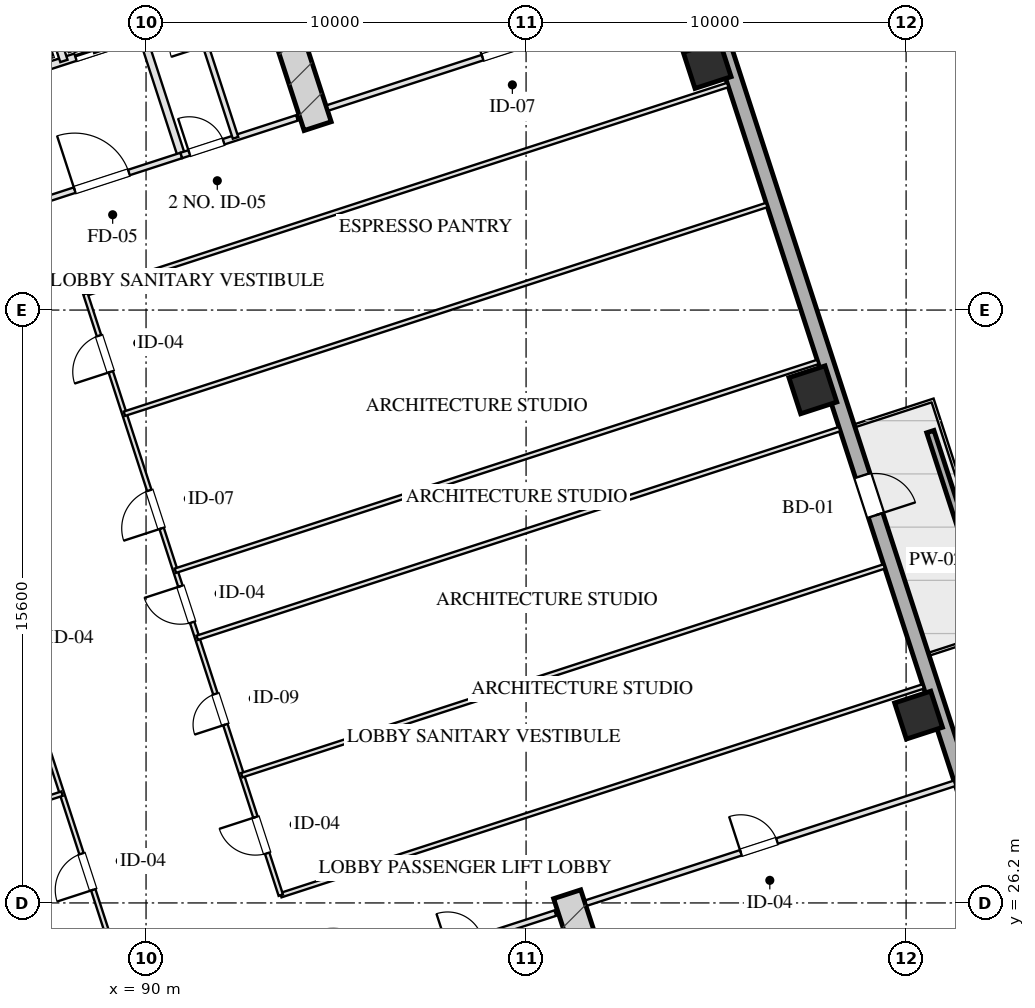
"""IFC4 building model, lengths in metres.
Left out: names, types, materials, properties, quantities, classifications, styles, units other than length and angle.
Written with IfcOpenShell. Run it as: python <this file> out.ifc"""

import sys

from ifc_helpers import new_model, si_unit, direction, frame, frame_2d, origin, origin_2d, place, context, subcontext, project, spatial, rectangle, hollow_rectangle, extrude, element, fill, save


model = new_model("IFC4")
c1 = context("Model", 3, precision=1e-05, world=origin(), true_north=direction((0.0, 1.0)))
c2 = subcontext(c1, "Body", "Model", "MODEL_VIEW")
j1 = project(units=[si_unit("LENGTHUNIT", "METRE"), si_unit("PLANEANGLEUNIT", "RADIAN")], contexts=[c1])
p1 = place(None, origin())
s1 = spatial("IfcSite", under=j1, at=p1, CompositionType="ELEMENT")
p2 = place(p1, origin())
s2 = spatial("IfcBuilding", under=s1, at=p2, CompositionType="ELEMENT")
p3 = place(p2, frame((0.0, 0.0, 60.95)))
s3 = spatial("IfcBuildingStorey", under=s2, at=p3, CompositionType="ELEMENT", Elevation=60.95)
for number, where, z_axis, x_axis in (
    (1, (101.082, 26.429, 0.0), (0.0, 0.0, 1.0), (0.309, -0.951, 0.0)),
    (2, (94.515, 46.639, 0.0), (0.0, 0.0, 1.0), (-0.309, 0.951, 0.0)),
):
    element("IfcWall", number, at=place(p3, frame(where, z_axis=z_axis, x_axis=x_axis)), inside=s3, PredefinedType="SHEAR", context=c2, shape_type="SweptSolid", body=[
        extrude(rectangle(XDim=9.63, YDim=0.75, at=frame_2d((4.815, 0.0))), origin(), (0.0, 0.0, 1.0), 3.45),
    ])
for number, where, z_axis, x_axis in (
    (3, (110.328, 31.142, 0.0), (0.0, 0.0, 1.0), (0.951, 0.309, 0.0)),
    (4, (107.547, 39.701, 0.0), (0.0, 0.0, 1.0), (0.951, 0.309, 0.0)),
    (5, (104.766, 48.261, 0.0), (0.0, 0.0, 1.0), (0.951, 0.309, 0.0)),
):
    element("IfcColumn", number, at=place(p3, frame(where, z_axis=z_axis, x_axis=x_axis)), inside=s3, PredefinedType="COLUMN", context=c2, shape_type="SweptSolid", body=[
        extrude(hollow_rectangle(XDim=1.0, YDim=1.0, WallThickness=0.036, at=origin_2d()), origin(), (0.0, 0.0, 1.0), 3.451),
    ])
p4 = place(p3, frame((100.345, 63.648, 0.0), z_axis=(0.0, 0.0, 1.0), x_axis=(0.309014526607, -0.951057318118, 0.0)))
e6 = element("IfcWall", 6, at=p4, inside=s3, PredefinedType="SOLIDWALL", context=c2, shape_type="SweptSolid", body=[
    extrude(rectangle(XDim=50.0, YDim=0.4, at=frame_2d((25.0, 0.0))), origin(), (0.0, 0.0, 1.0), 2.61),
])
p5 = place(p4, frame((27.55, 0.0, 0.0)))
e7 = element("IfcOpeningElement", 7, at=p5, cuts=e6, PredefinedType="OPENING", context=c2, shape_type="SweptSolid", body=[
    extrude(rectangle(XDim=1.1, YDim=2.15, at=frame_2d((0.55, 1.075))), frame((0.0, 0.21, 0.0), z_axis=(0.0, -1.0, 0.0), x_axis=(1.0, 0.0, 0.0)), (0.0, 0.0, 1.0), 0.42),
])
p6 = place(p3, frame((112.121, 34.038, 0.0), z_axis=(0.0, 0.0, 1.0), x_axis=(-0.309032019345, 0.951051634255, 0.0)))
e8 = element("IfcWall", 8, at=p6, inside=s3, PredefinedType="PARAPET", context=c2, shape_type="SweptSolid", body=[
    extrude(rectangle(XDim=4.8, YDim=0.2, at=frame_2d((2.4, 0.0))), origin(), (0.0, 0.0, 1.0), 0.75),
])
p7 = place(p3, frame((97.727, 24.944, 0.0), z_axis=(0.0, 0.0, 1.0), x_axis=(0.951036872128, 0.309077446369, 0.0)))
e9 = element("IfcWall", 9, at=p7, inside=s3, PredefinedType="PARTITIONING", context=c2, shape_type="SweptSolid", body=[
    extrude(rectangle(XDim=3.2, YDim=0.15, at=frame_2d((1.6, 0.0))), origin(), (0.0, 0.0, 1.0), 3.175),
])
p8 = place(p7, frame((0.22, 0.0, 0.0)))
e10 = element("IfcOpeningElement", 10, at=p8, cuts=e9, PredefinedType="OPENING", context=c2, shape_type="SweptSolid", body=[
    extrude(rectangle(XDim=0.95, YDim=2.05, at=frame_2d((0.475, 1.025))), frame((0.0, 0.085, 0.0), z_axis=(0.0, -1.0, 0.0), x_axis=(1.0, 0.0, 0.0)), (0.0, 0.0, 1.0), 0.17),
])
p9 = place(p3, frame((90.928, 45.868, 0.0), z_axis=(0.0, 0.0, 1.0), x_axis=(-0.309042196757, 0.951048327176, 0.0)))
e11 = element("IfcWall", 11, at=p9, inside=s3, PredefinedType="PARTITIONING", context=c2, shape_type="SweptSolid", body=[
    extrude(rectangle(XDim=8.43, YDim=0.2, at=frame_2d((4.215, 0.0))), origin(), (0.0, 0.0, 1.0), 3.175),
])
p10 = place(p3, frame((86.743, 44.508, 0.0), z_axis=(0.0, 0.0, 1.0), x_axis=(0.951063829732, 0.308994485023, 0.0)))
e12 = element("IfcWall", 12, at=p10, inside=s3, PredefinedType="PARTITIONING", context=c2, shape_type="SweptSolid", body=[
    extrude(rectangle(XDim=4.4, YDim=0.15, at=frame_2d((2.2, 0.0))), origin(), (0.0, 0.0, 1.0), 3.175),
])
p11 = place(p10, frame((1.45, 0.0, 0.0)))
e13 = element("IfcOpeningElement", 13, at=p11, cuts=e12, PredefinedType="OPENING", context=c2, shape_type="SweptSolid", body=[
    extrude(rectangle(XDim=1.5, YDim=2.05, at=frame_2d((0.75, 1.025))), frame((0.0, 0.085, 0.0), z_axis=(0.0, -1.0, 0.0), x_axis=(1.0, 0.0, 0.0)), (0.0, 0.0, 1.0), 0.17),
])
p12 = place(p3, frame((85.718, 47.666, 0.0), z_axis=(0.0, 0.0, 1.0), x_axis=(0.951058531764, 0.30901079133, 0.0)))
e14 = element("IfcWall", 14, at=p12, inside=s3, PredefinedType="PARTITIONING", context=c2, shape_type="SweptSolid", body=[
    extrude(rectangle(XDim=4.4, YDim=0.2, at=frame_2d((2.2, 0.0))), origin(), (0.0, 0.0, 1.0), 3.175),
])
p13 = place(p12, frame((0.45, 0.0, 0.0)))
e15 = element("IfcOpeningElement", 15, at=p13, cuts=e14, PredefinedType="OPENING", context=c2, shape_type="SweptSolid", body=[
    extrude(rectangle(XDim=1.1, YDim=2.05, at=frame_2d((0.55, 1.025))), frame((0.0, 0.11, 0.0), z_axis=(0.0, -1.0, 0.0), x_axis=(1.0, 0.0, 0.0)), (0.0, 0.0, 1.0), 0.22),
])
p14 = place(p12, frame((2.55, 0.0, 0.0)))
e16 = element("IfcOpeningElement", 16, at=p14, cuts=e14, PredefinedType="OPENING", context=c2, shape_type="SweptSolid", body=[
    extrude(rectangle(XDim=1.1, YDim=2.05, at=frame_2d((0.55, 1.025))), frame((0.0, 0.11, 0.0), z_axis=(0.0, -1.0, 0.0), x_axis=(1.0, 0.0, 0.0)), (0.0, 0.0, 1.0), 0.22),
])
p15 = place(p3, frame((87.838, 48.354, 0.0), z_axis=(0.0, 0.0, 1.0), x_axis=(-0.3090093719, 0.951058992953, 0.0)))
e17 = element("IfcWall", 17, at=p15, inside=s3, PredefinedType="PARTITIONING", context=c2, shape_type="SweptSolid", body=[
    extrude(rectangle(XDim=5.11, YDim=0.2, at=frame_2d((2.555, 0.0))), origin(), (0.0, 0.0, 1.0), 3.175),
])
p16 = place(p3, frame((90.928, 45.868, 0.0), z_axis=(0.0, 0.0, 1.0), x_axis=(0.951059297078, 0.309008435874, 0.0)))
e18 = element("IfcWall", 18, at=p16, inside=s3, PredefinedType="PARTITIONING", context=c2, shape_type="SweptSolid", body=[
    extrude(rectangle(XDim=3.2, YDim=0.15, at=frame_2d((1.6, 0.0))), origin(), (0.0, 0.0, 1.0), 3.175),
])
p17 = place(p16, frame((0.22, 0.0, 0.0)))
e19 = element("IfcOpeningElement", 19, at=p17, cuts=e18, PredefinedType="OPENING", context=c2, shape_type="SweptSolid", body=[
    extrude(rectangle(XDim=0.95, YDim=2.05, at=frame_2d((0.475, 1.025))), frame((0.0, 0.085, 0.0), z_axis=(0.0, -1.0, 0.0), x_axis=(1.0, 0.0, 0.0)), (0.0, 0.0, 1.0), 0.17),
])
p18 = place(p3, frame((92.355, 46.331, 0.0), z_axis=(0.0, 0.0, 1.0), x_axis=(-0.309007490203, 0.951059604335, 0.0)))
e20 = element("IfcWall", 20, at=p18, inside=s3, PredefinedType="PARTITIONING", context=c2, shape_type="SweptSolid", body=[
    extrude(rectangle(XDim=8.43, YDim=0.15, at=frame_2d((4.215, 0.0))), origin(), (0.0, 0.0, 1.0), 3.175),
])
p19 = place(p18, frame((2.55, 0.0, 0.0)))
e21 = element("IfcOpeningElement", 21, at=p19, cuts=e20, PredefinedType="OPENING", context=c2, shape_type="SweptSolid", body=[
    extrude(rectangle(XDim=0.95, YDim=2.05, at=frame_2d((0.475, 1.025))), frame((0.0, 0.085, 0.0), z_axis=(0.0, -1.0, 0.0), x_axis=(1.0, 0.0, 0.0)), (0.0, 0.0, 1.0), 0.17),
])
p20 = place(p18, frame((4.7, 0.0, 0.0)))
e22 = element("IfcOpeningElement", 22, at=p20, cuts=e20, PredefinedType="OPENING", context=c2, shape_type="SweptSolid", body=[
    extrude(rectangle(XDim=0.9, YDim=2.05, at=frame_2d((0.45, 1.025))), frame((0.0, 0.085, 0.0), z_axis=(0.0, -1.0, 0.0), x_axis=(1.0, 0.0, 0.0)), (0.0, 0.0, 1.0), 0.17),
])
p21 = place(p18, frame((6.8, 0.0, 0.0)))
e23 = element("IfcOpeningElement", 23, at=p21, cuts=e20, PredefinedType="OPENING", context=c2, shape_type="SweptSolid", body=[
    extrude(rectangle(XDim=0.9, YDim=2.05, at=frame_2d((0.45, 1.025))), frame((0.0, 0.085, 0.0), z_axis=(0.0, -1.0, 0.0), x_axis=(1.0, 0.0, 0.0)), (0.0, 0.0, 1.0), 0.17),
])
p22 = place(p3, frame((101.578, 26.196, 0.0), z_axis=(0.0, 0.0, 1.0), x_axis=(0.951059043131, 0.309009217467, 0.0)))
e24 = element("IfcWall", 24, at=p22, inside=s3, PredefinedType="PARTITIONING", context=c2, shape_type="SweptSolid", body=[
    extrude(rectangle(XDim=10.2, YDim=0.15, at=frame_2d((5.1, 0.0))), origin(), (0.0, 0.0, 1.0), 3.175),
])
p23 = place(p22, frame((4.284, 0.0, 0.0)))
e25 = element("IfcOpeningElement", 25, at=p23, cuts=e24, PredefinedType="OPENING", context=c2, shape_type="SweptSolid", body=[
    extrude(rectangle(XDim=1.0, YDim=2.05, at=frame_2d((0.5, 1.025))), frame((0.0, 0.085, 0.0), z_axis=(0.0, -1.0, 0.0), x_axis=(1.0, 0.0, 0.0)), (0.0, 0.0, 1.0), 0.17),
])
p24 = place(p3, frame((94.78, 47.119, 0.0), z_axis=(0.0, 0.0, 1.0), x_axis=(0.951054294345, 0.309023832749, 0.0)))
e26 = element("IfcWall", 26, at=p24, inside=s3, PredefinedType="PARTITIONING", context=c2, shape_type="SweptSolid", body=[
    extrude(rectangle(XDim=10.2, YDim=0.15, at=frame_2d((5.1, 0.0))), origin(), (0.0, 0.0, 1.0), 3.175),
])
p25 = place(p24, frame((4.284, 0.0, 0.0)))
e27 = element("IfcOpeningElement", 27, at=p25, cuts=e26, PredefinedType="OPENING", context=c2, shape_type="SweptSolid", body=[
    extrude(rectangle(XDim=1.05, YDim=2.05, at=frame_2d((0.525, 1.025))), frame((0.0, 0.085, 0.0), z_axis=(0.0, -1.0, 0.0), x_axis=(1.0, 0.0, 0.0)), (0.0, 0.0, 1.0), 0.17),
])
p26 = place(p3, frame((93.546, 26.404, 0.0), z_axis=(0.0, 0.0, 1.0), x_axis=(0.951058189574, 0.309011844505, 0.0)))
e28 = element("IfcWall", 28, at=p26, inside=s3, PredefinedType="PARTITIONING", context=c2, shape_type="SweptSolid", body=[
    extrude(rectangle(XDim=17.775, YDim=0.12, at=frame_2d((8.887, 0.0))), origin(), (0.0, 0.0, 1.0), 3.175),
])
p27 = place(p3, frame((88.404, 42.229, 0.0), z_axis=(0.0, 0.0, 1.0), x_axis=(0.951054152931, 0.309024267966, 0.0)))
e29 = element("IfcWall", 29, at=p27, inside=s3, PredefinedType="PARTITIONING", context=c2, shape_type="SweptSolid", body=[
    extrude(rectangle(XDim=17.775, YDim=0.12, at=frame_2d((8.888, 0.0))), origin(), (0.0, 0.0, 1.0), 3.175),
])
p28 = place(p3, frame((89.124, 24.967, 0.0), z_axis=(0.0, 0.0, 1.0), x_axis=(-0.30901773025, 0.951056277195, 0.0)))
e30 = element("IfcWall", 30, at=p28, inside=s3, PredefinedType="PARTITIONING", context=c2, shape_type="SweptSolid", body=[
    extrude(rectangle(XDim=16.64, YDim=0.12, at=frame_2d((8.32, 0.0))), origin(), (0.0, 0.0, 1.0), 3.175),
])
p29 = place(p28, frame((1.66, 0.0, 0.0)))
e31 = element("IfcOpeningElement", 31, at=p29, cuts=e30, PredefinedType="OPENING", context=c2, shape_type="SweptSolid", body=[
    extrude(rectangle(XDim=1.0, YDim=2.05, at=frame_2d((0.5, 1.025))), frame((0.0, 0.07, 0.0), z_axis=(0.0, -1.0, 0.0), x_axis=(1.0, 0.0, 0.0)), (0.0, 0.0, 1.0), 0.14),
])
p30 = place(p28, frame((7.82, 0.0, 0.0)))
e32 = element("IfcOpeningElement", 32, at=p30, cuts=e30, PredefinedType="OPENING", context=c2, shape_type="SweptSolid", body=[
    extrude(rectangle(XDim=1.0, YDim=2.05, at=frame_2d((0.5, 1.025))), frame((0.0, 0.07, 0.0), z_axis=(0.0, -1.0, 0.0), x_axis=(1.0, 0.0, 0.0)), (0.0, 0.0, 1.0), 0.14),
])
p31 = place(p28, frame((13.98, 0.0, 0.0)))
e33 = element("IfcOpeningElement", 33, at=p31, cuts=e30, PredefinedType="OPENING", context=c2, shape_type="SweptSolid", body=[
    extrude(rectangle(XDim=1.0, YDim=2.05, at=frame_2d((0.5, 1.025))), frame((0.0, 0.07, 0.0), z_axis=(0.0, -1.0, 0.0), x_axis=(1.0, 0.0, 0.0)), (0.0, 0.0, 1.0), 0.14),
])
p32 = place(p3, frame((93.546, 26.404, 0.0), z_axis=(0.0, 0.0, 1.0), x_axis=(-0.309022042254, 0.951054876125, 0.0)))
e34 = element("IfcWall", 34, at=p32, inside=s3, PredefinedType="PARTITIONING", context=c2, shape_type="SweptSolid", body=[
    extrude(rectangle(XDim=16.64, YDim=0.12, at=frame_2d((8.32, 0.0))), origin(), (0.0, 0.0, 1.0), 3.175),
])
p33 = place(p32, frame((1.16, 0.0, 0.0)))
e35 = element("IfcOpeningElement", 35, at=p33, cuts=e34, PredefinedType="OPENING", context=c2, shape_type="SweptSolid", body=[
    extrude(rectangle(XDim=1.0, YDim=2.05, at=frame_2d((0.5, 1.025))), frame((0.0, 0.07, 0.0), z_axis=(0.0, -1.0, 0.0), x_axis=(1.0, 0.0, 0.0)), (0.0, 0.0, 1.0), 0.14),
])
p34 = place(p32, frame((4.72, 0.0, 0.0)))
e36 = element("IfcOpeningElement", 36, at=p34, cuts=e34, PredefinedType="OPENING", context=c2, shape_type="SweptSolid", body=[
    extrude(rectangle(XDim=0.85, YDim=2.05, at=frame_2d((0.425, 1.025))), frame((0.0, 0.07, 0.0), z_axis=(0.0, -1.0, 0.0), x_axis=(1.0, 0.0, 0.0)), (0.0, 0.0, 1.0), 0.14),
])
p35 = place(p32, frame((7.549, 0.0, 0.0)))
e37 = element("IfcOpeningElement", 37, at=p35, cuts=e34, PredefinedType="OPENING", context=c2, shape_type="SweptSolid", body=[
    extrude(rectangle(XDim=1.0, YDim=2.05, at=frame_2d((0.5, 1.025))), frame((0.0, 0.07, 0.0), z_axis=(0.0, -1.0, 0.0), x_axis=(1.0, 0.0, 0.0)), (0.0, 0.0, 1.0), 0.14),
])
p36 = place(p32, frame((10.148, 0.0, 0.0)))
e38 = element("IfcOpeningElement", 38, at=p36, cuts=e34, PredefinedType="OPENING", context=c2, shape_type="SweptSolid", body=[
    extrude(rectangle(XDim=1.05, YDim=2.05, at=frame_2d((0.525, 1.025))), frame((0.0, 0.07, 0.0), z_axis=(0.0, -1.0, 0.0), x_axis=(1.0, 0.0, 0.0)), (0.0, 0.0, 1.0), 0.14),
])
p37 = place(p32, frame((14.48, 0.0, 0.0)))
e39 = element("IfcOpeningElement", 39, at=p37, cuts=e34, PredefinedType="OPENING", context=c2, shape_type="SweptSolid", body=[
    extrude(rectangle(XDim=1.0, YDim=2.05, at=frame_2d((0.5, 1.025))), frame((0.0, 0.07, 0.0), z_axis=(0.0, -1.0, 0.0), x_axis=(1.0, 0.0, 0.0)), (0.0, 0.0, 1.0), 0.14),
])
p38 = place(p3, frame((73.356, 24.386, 0.0), z_axis=(0.0, 0.0, 1.0), x_axis=(0.951054756643, 0.309022409974, 0.0)))
e40 = element("IfcWall", 40, at=p38, inside=s3, PredefinedType="PARTITIONING", context=c2, shape_type="SweptSolid", body=[
    extrude(rectangle(XDim=15.175, YDim=0.12, at=frame_2d((7.587, 0.0))), origin(), (0.0, 0.0, 1.0), 3.175),
])
for number, where, z_axis, x_axis in (
    (41, (92.52, 29.562, 0.0), (0.0, 0.0, 1.0), (0.951, 0.309, 0.0)),
    (42, (91.346, 33.176, 0.0), (0.0, 0.0, 1.0), (0.951, 0.309, 0.0)),
    (43, (90.772, 34.942, 0.0), (0.0, 0.0, 1.0), (0.951, 0.309, 0.0)),
    (44, (89.43, 39.072, 0.0), (0.0, 0.0, 1.0), (0.951, 0.309, 0.0)),
):
    element("IfcWall", number, at=place(p3, frame(where, z_axis=z_axis, x_axis=x_axis)), inside=s3, PredefinedType="PARTITIONING", context=c2, shape_type="SweptSolid", body=[
        extrude(rectangle(XDim=17.775, YDim=0.12, at=frame_2d((8.887, 0.0))), origin(), (0.0, 0.0, 1.0), 3.175),
    ])
p39 = place(p5, origin())
e45 = element("IfcDoor", 45, at=p39, inside=s3, OperationType="SINGLE_SWING_RIGHT", PredefinedType="DOOR", context=c2, shape_type="SweptSolid", body=[
    extrude(rectangle(XDim=1.1, YDim=2.15, at=frame_2d((0.55, 1.075))), frame((0.0, 0.025, 0.0), z_axis=(0.0, -1.0, 0.0), x_axis=(1.0, 0.0, 0.0)), (0.0, 0.0, 1.0), 0.05),
])
fill(e7, e45)
p40 = place(p11, origin())
e46 = element("IfcDoor", 46, at=p40, inside=s3, OperationType="SINGLE_SWING_LEFT", PredefinedType="DOOR", context=c2, shape_type="SweptSolid", body=[
    extrude(rectangle(XDim=1.5, YDim=2.05, at=frame_2d((0.75, 1.025))), frame((0.0, 0.025, 0.0), z_axis=(0.0, -1.0, 0.0), x_axis=(1.0, 0.0, 0.0)), (0.0, 0.0, 1.0), 0.05),
])
fill(e13, e46)
p41 = place(p14, origin())
e47 = element("IfcDoor", 47, at=p41, inside=s3, OperationType="DOUBLE_DOOR_SLIDING", PredefinedType="DOOR", context=c2, shape_type="SweptSolid", body=[
    extrude(rectangle(XDim=1.1, YDim=2.05, at=frame_2d((0.55, 1.025))), frame((0.0, 0.025, 0.0), z_axis=(0.0, -1.0, 0.0), x_axis=(1.0, 0.0, 0.0)), (0.0, 0.0, 1.0), 0.05),
])
fill(e16, e47)
p42 = place(p17, origin())
e48 = element("IfcDoor", 48, at=p42, inside=s3, OperationType="SINGLE_SWING_LEFT", PredefinedType="DOOR", context=c2, shape_type="SweptSolid", body=[
    extrude(rectangle(XDim=0.95, YDim=2.05, at=frame_2d((0.475, 1.025))), frame((0.0, 0.025, 0.0), z_axis=(0.0, -1.0, 0.0), x_axis=(1.0, 0.0, 0.0)), (0.0, 0.0, 1.0), 0.05),
])
fill(e19, e48)
p43 = place(p23, origin())
e49 = element("IfcDoor", 49, at=p43, inside=s3, OperationType="SINGLE_SWING_LEFT", PredefinedType="DOOR", context=c2, shape_type="SweptSolid", body=[
    extrude(rectangle(XDim=1.0, YDim=2.05, at=frame_2d((0.5, 1.025))), frame((0.0, 0.025, 0.0), z_axis=(0.0, -1.0, 0.0), x_axis=(1.0, 0.0, 0.0)), (0.0, 0.0, 1.0), 0.05),
])
fill(e25, e49)
p44 = place(p25, origin())
e50 = element("IfcDoor", 50, at=p44, inside=s3, OperationType="SINGLE_SWING_LEFT", PredefinedType="DOOR", context=c2, shape_type="SweptSolid", body=[
    extrude(rectangle(XDim=1.05, YDim=2.05, at=frame_2d((0.525, 1.025))), frame((0.0, 0.025, 0.0), z_axis=(0.0, -1.0, 0.0), x_axis=(1.0, 0.0, 0.0)), (0.0, 0.0, 1.0), 0.05),
])
fill(e27, e50)
p45 = place(p29, origin())
e51 = element("IfcDoor", 51, at=p45, inside=s3, OperationType="SINGLE_SWING_LEFT", PredefinedType="DOOR", context=c2, shape_type="SweptSolid", body=[
    extrude(rectangle(XDim=1.0, YDim=2.05, at=frame_2d((0.5, 1.025))), frame((0.0, 0.025, 0.0), z_axis=(0.0, -1.0, 0.0), x_axis=(1.0, 0.0, 0.0)), (0.0, 0.0, 1.0), 0.05),
])
fill(e31, e51)
p46 = place(p33, origin())
e52 = element("IfcDoor", 52, at=p46, inside=s3, OperationType="SINGLE_SWING_RIGHT", PredefinedType="DOOR", context=c2, shape_type="SweptSolid", body=[
    extrude(rectangle(XDim=1.0, YDim=2.05, at=frame_2d((0.5, 1.025))), frame((0.0, 0.025, 0.0), z_axis=(0.0, -1.0, 0.0), x_axis=(1.0, 0.0, 0.0)), (0.0, 0.0, 1.0), 0.05),
])
fill(e35, e52)
p47 = place(p34, origin())
e53 = element("IfcDoor", 53, at=p47, inside=s3, OperationType="SINGLE_SWING_LEFT", PredefinedType="DOOR", context=c2, shape_type="SweptSolid", body=[
    extrude(rectangle(XDim=0.85, YDim=2.05, at=frame_2d((0.425, 1.025))), frame((0.0, 0.025, 0.0), z_axis=(0.0, -1.0, 0.0), x_axis=(1.0, 0.0, 0.0)), (0.0, 0.0, 1.0), 0.05),
])
fill(e36, e53)
p48 = place(p35, origin())
e54 = element("IfcDoor", 54, at=p48, inside=s3, OperationType="SINGLE_SWING_RIGHT", PredefinedType="DOOR", context=c2, shape_type="SweptSolid", body=[
    extrude(rectangle(XDim=1.0, YDim=2.05, at=frame_2d((0.5, 1.025))), frame((0.0, 0.025, 0.0), z_axis=(0.0, -1.0, 0.0), x_axis=(1.0, 0.0, 0.0)), (0.0, 0.0, 1.0), 0.05),
])
fill(e37, e54)
p49 = place(p36, origin())
e55 = element("IfcDoor", 55, at=p49, inside=s3, OperationType="SINGLE_SWING_LEFT", PredefinedType="DOOR", context=c2, shape_type="SweptSolid", body=[
    extrude(rectangle(XDim=1.05, YDim=2.05, at=frame_2d((0.525, 1.025))), frame((0.0, 0.025, 0.0), z_axis=(0.0, -1.0, 0.0), x_axis=(1.0, 0.0, 0.0)), (0.0, 0.0, 1.0), 0.05),
])
fill(e38, e55)
p50 = place(p37, origin())
e56 = element("IfcDoor", 56, at=p50, inside=s3, OperationType="SINGLE_SWING_LEFT", PredefinedType="DOOR", context=c2, shape_type="SweptSolid", body=[
    extrude(rectangle(XDim=1.0, YDim=2.05, at=frame_2d((0.5, 1.025))), frame((0.0, 0.025, 0.0), z_axis=(0.0, -1.0, 0.0), x_axis=(1.0, 0.0, 0.0)), (0.0, 0.0, 1.0), 0.05),
])
fill(e39, e56)
save(model, sys.argv[1])
